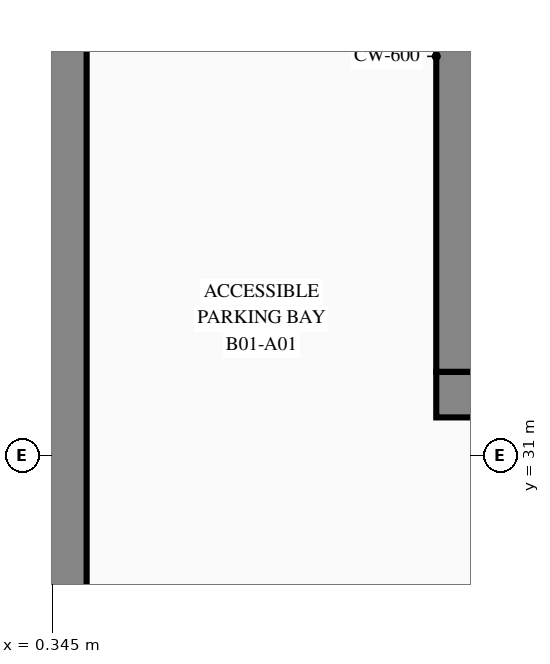
"""IFC4 building model, lengths in metres.
Left out: names, types, materials, properties, quantities, classifications, styles, units other than length and angle.
Written with IfcOpenShell. Run it as: python <this file> out.ifc"""

import sys

from ifc_helpers import new_model, si_unit, direction, frame, frame_2d, origin, place, context, subcontext, project, spatial, rectangle, extrude, element, save


model = new_model("IFC4")
c1 = context("Model", 3, precision=1e-05, world=origin(), true_north=direction((0.0, 1.0)))
c2 = subcontext(c1, "Body", "Model", "MODEL_VIEW")
j1 = project(units=[si_unit("LENGTHUNIT", "METRE"), si_unit("PLANEANGLEUNIT", "RADIAN")], contexts=[c1])
p1 = place(None, origin())
s1 = spatial("IfcSite", under=j1, at=p1, CompositionType="ELEMENT")
p2 = place(p1, origin())
s2 = spatial("IfcBuilding", under=s1, at=p2, CompositionType="ELEMENT")
p3 = place(p2, frame((0.0, 0.0, -4.5)))
s3 = spatial("IfcBuildingStorey", under=s2, at=p3, CompositionType="ELEMENT", Elevation=-4.5)
p4 = place(p3, frame((0.4, 0.8, 0.0), z_axis=(0.0, 0.0, 1.0), x_axis=(0.0, 1.0, 0.0)))
e1 = element("IfcWall", 1, at=p4, inside=s3, PredefinedType="USERDEFINED", context=c2, shape_type="SweptSolid", body=[
    extrude(rectangle(XDim=44.4, YDim=0.8, at=frame_2d((22.2, 0.0))), origin(), (0.0, 0.0, 1.0), 4.5),
])
p5 = place(p3, frame((5.4, 31.8, 0.0), z_axis=(0.0, 0.0, 1.0), x_axis=(1.0, 0.0, 0.0)))
e2 = element("IfcWall", 2, at=p5, inside=s3, PredefinedType="SHEAR", context=c2, shape_type="SweptSolid", body=[
    extrude(rectangle(XDim=18.05, YDim=0.6, at=frame_2d((9.025, 0.0))), origin(), (0.0, 0.0, 1.0), 4.5),
])
p6 = place(p5, frame((3.25, 0.0, 0.0)))
e3 = element("IfcOpeningElement", 3, at=p6, cuts=e2, PredefinedType="OPENING", context=c2, shape_type="SweptSolid", body=[
    extrude(rectangle(XDim=1.2, YDim=2.2, at=frame_2d((0.6, 1.1))), frame((0.0, 0.31, 0.0), z_axis=(0.0, -1.0, 0.0), x_axis=(1.0, 0.0, 0.0)), (0.0, 0.0, 1.0), 0.62),
])
p7 = place(p5, frame((7.1, 0.0, 0.0)))
e4 = element("IfcOpeningElement", 4, at=p7, cuts=e2, PredefinedType="OPENING", context=c2, shape_type="SweptSolid", body=[
    extrude(rectangle(XDim=1.2, YDim=2.2, at=frame_2d((0.6, 1.1))), frame((0.0, 0.31, 0.0), z_axis=(0.0, -1.0, 0.0), x_axis=(1.0, 0.0, 0.0)), (0.0, 0.0, 1.0), 0.62),
])
p8 = place(p5, frame((8.95, 0.0, 0.0)))
e5 = element("IfcOpeningElement", 5, at=p8, cuts=e2, PredefinedType="OPENING", context=c2, shape_type="SweptSolid", body=[
    extrude(rectangle(XDim=1.15, YDim=2.2, at=frame_2d((0.575, 1.1))), frame((0.0, 0.31, 0.0), z_axis=(0.0, -1.0, 0.0), x_axis=(1.0, 0.0, 0.0)), (0.0, 0.0, 1.0), 0.62),
])
p9 = place(p5, frame((16.05, 0.0, 0.0)))
e6 = element("IfcOpeningElement", 6, at=p9, cuts=e2, PredefinedType="OPENING", context=c2, shape_type="SweptSolid", body=[
    extrude(rectangle(XDim=1.2, YDim=2.2, at=frame_2d((0.6, 1.1))), frame((0.0, 0.31, 0.0), z_axis=(0.0, -1.0, 0.0), x_axis=(1.0, 0.0, 0.0)), (0.0, 0.0, 1.0), 0.62),
])
p10 = place(p3, frame((5.7, 32.1, 0.0), z_axis=(0.0, 0.0, 1.0), x_axis=(0.0, 1.0, 0.0)))
e7 = element("IfcWall", 7, at=p10, inside=s3, PredefinedType="SHEAR", context=c2, shape_type="SweptSolid", body=[
    extrude(rectangle(XDim=8.3, YDim=0.6, at=frame_2d((4.15, 0.0))), origin(), (0.0, 0.0, 1.0), 4.5),
])
save(model, sys.argv[1])
